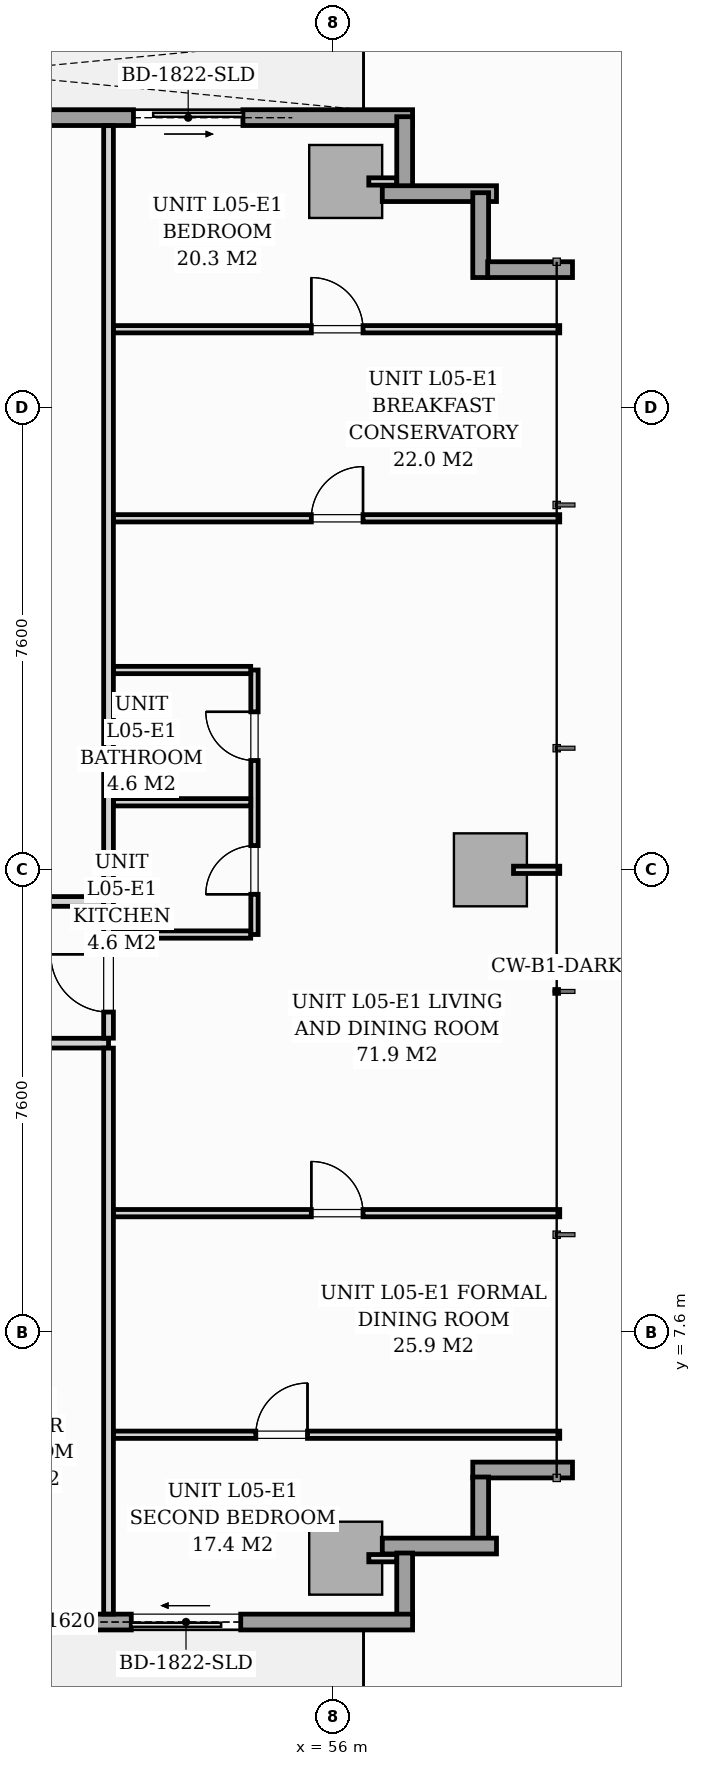
"""IFC4 building model, lengths in metres.
Left out: names, types, materials, properties, quantities, classifications, styles, units other than length and angle.
Written with IfcOpenShell. Run it as: python <this file> out.ifc"""

import sys

from ifc_helpers import new_model, si_unit, direction, frame, frame_2d, origin, origin_2d, place, context, subcontext, project, spatial, rectangle, extrude, source, transform, mapped, element, fill, save


model = new_model("IFC4")
c1 = context("Model", 3, precision=1e-05, world=origin(), true_north=direction((0.0, 1.0)))
c2 = subcontext(c1, "Body", "Model", "MODEL_VIEW")
j1 = project(units=[si_unit("LENGTHUNIT", "METRE"), si_unit("PLANEANGLEUNIT", "RADIAN")], contexts=[c1])
p1 = place(None, origin())
s1 = spatial("IfcSite", under=j1, at=p1, CompositionType="ELEMENT")
p2 = place(p1, origin())
s2 = spatial("IfcBuilding", under=s1, at=p2, CompositionType="ELEMENT")
p3 = place(p2, frame((0.0, 0.0, 23.0)))
s3 = spatial("IfcBuildingStorey", under=s2, at=p3, CompositionType="ELEMENT", Elevation=23.0)
m1 = source(origin(), c2, "Body", "SweptSolid", [
    extrude(rectangle(XDim=1.2, YDim=1.2, at=origin_2d()), origin(), (0.0, 0.0, 1.0), 3.194),
])
for number, where, z_axis, x_axis in (
    (1, (56.2, 3.88, 0.004), (0.0, 0.0, 1.0), (1.0, 0.0, 0.0)),
    (2, (56.2, 26.52, 0.004), (0.0, 0.0, 1.0), (1.0, 0.0, 0.0)),
    (3, (58.58, 15.2, 0.004), (0.0, 0.0, 1.0), (1.0, 0.0, 0.0)),
):
    element("IfcColumn", number, at=place(p3, frame(where, z_axis=z_axis, x_axis=x_axis)), inside=s3, PredefinedType="COLUMN", context=c2, shape_type="MappedRepresentation", body=[
        mapped(m1, transform((0.0, 0.0, 0.0), scale=1.0)),
    ])
p4 = place(p3, frame((40.15, 27.57, 0.0), z_axis=(0.0, 0.0, 1.0), x_axis=(1.0, 0.0, 0.0)))
e4 = element("IfcWall", 4, at=p4, inside=s3, PredefinedType="STANDARD", context=c2, shape_type="SweptSolid", body=[
    extrude(rectangle(XDim=17.15, YDim=0.26, at=frame_2d((8.575, 0.0))), origin(), (0.0, 0.0, 1.0), 2.94),
])
p5 = place(p4, frame((12.56, 0.0, 0.0)))
e5 = element("IfcOpeningElement", 5, at=p5, cuts=e4, PredefinedType="OPENING", context=c2, shape_type="SweptSolid", body=[
    extrude(rectangle(XDim=1.8, YDim=2.06, at=frame_2d((0.9, 1.03))), frame((0.0, 0.14, 0.0), z_axis=(0.0, -1.0, 0.0), x_axis=(1.0, 0.0, 0.0)), (0.0, 0.0, 1.0), 0.28),
])
p6 = place(p4, frame((0.7, 0.0, 0.65)))
e6 = element("IfcOpeningElement", 6, at=p6, cuts=e4, PredefinedType="OPENING", context=c2, shape_type="SweptSolid", body=[
    extrude(rectangle(XDim=1.6, YDim=1.5, at=frame_2d((0.8, 0.75))), frame((0.0, 0.14, 0.0), z_axis=(0.0, -1.0, 0.0), x_axis=(1.0, 0.0, 0.0)), (0.0, 0.0, 1.0), 0.28),
])
p7 = place(p3, frame((57.17, 27.585, 0.0), z_axis=(0.0, 0.0, 1.0), x_axis=(0.0, -1.0, 0.0)))
e7 = element("IfcWall", 7, at=p7, inside=s3, PredefinedType="STANDARD", context=c2, shape_type="SweptSolid", body=[
    extrude(rectangle(XDim=1.15, YDim=0.26, at=frame_2d((0.575, 0.0))), origin(), (0.0, 0.0, 1.0), 2.94),
])
p8 = place(p3, frame((56.802, 26.32, 0.0), z_axis=(0.0, 0.0, 1.0), x_axis=(1.0, 0.0, 0.0)))
e8 = element("IfcWall", 8, at=p8, inside=s3, PredefinedType="STANDARD", context=c2, shape_type="SweptSolid", body=[
    extrude(rectangle(XDim=1.878, YDim=0.26, at=frame_2d((0.939, 0.0))), origin(), (0.0, 0.0, 1.0), 2.94),
])
for number, where, z_axis, x_axis in (
    (9, (58.42, 26.335, 0.0), (0.0, 0.0, 1.0), (0.0, -1.0, 0.0)),
    (10, (58.535, 25.07, 0.0), (0.0, 0.0, 1.0), (1.0, 0.0, 0.0)),
):
    element("IfcWall", number, at=place(p3, frame(where, z_axis=z_axis, x_axis=x_axis)), inside=s3, PredefinedType="STANDARD", context=c2, shape_type="SweptSolid", body=[
        extrude(rectangle(XDim=1.395, YDim=0.26, at=frame_2d((0.698, 0.0))), origin(), (0.0, 0.0, 1.0), 2.94),
    ])
p9 = place(p3, frame((59.93, 5.33, 0.0), z_axis=(0.0, 0.0, 1.0), x_axis=(-1.0, 0.0, 0.0)))
e11 = element("IfcWall", 11, at=p9, inside=s3, PredefinedType="STANDARD", context=c2, shape_type="SweptSolid", body=[
    extrude(rectangle(XDim=1.64, YDim=0.26, at=frame_2d((0.82, 0.0))), origin(), (0.0, 0.0, 1.0), 2.94),
])
p10 = place(p3, frame((58.42, 5.215, 0.0), z_axis=(0.0, 0.0, 1.0), x_axis=(0.0, -1.0, 0.0)))
e12 = element("IfcWall", 12, at=p10, inside=s3, PredefinedType="STANDARD", context=c2, shape_type="SweptSolid", body=[
    extrude(rectangle(XDim=1.15, YDim=0.26, at=frame_2d((0.575, 0.0))), origin(), (0.0, 0.0, 1.0), 2.94),
])
p11 = place(p3, frame((58.68, 4.08, 0.0), z_axis=(0.0, 0.0, 1.0), x_axis=(-1.0, 0.0, 0.0)))
e13 = element("IfcWall", 13, at=p11, inside=s3, PredefinedType="STANDARD", context=c2, shape_type="SweptSolid", body=[
    extrude(rectangle(XDim=1.878, YDim=0.26, at=frame_2d((0.939, 0.0))), origin(), (0.0, 0.0, 1.0), 2.94),
])
p12 = place(p3, frame((57.17, 3.965, 0.0), z_axis=(0.0, 0.0, 1.0), x_axis=(0.0, -1.0, 0.0)))
e14 = element("IfcWall", 14, at=p12, inside=s3, PredefinedType="STANDARD", context=c2, shape_type="SweptSolid", body=[
    extrude(rectangle(XDim=1.15, YDim=0.26, at=frame_2d((0.575, 0.0))), origin(), (0.0, 0.0, 1.0), 2.94),
])
p13 = place(p3, frame((57.3, 2.83, 0.0), z_axis=(0.0, 0.0, 1.0), x_axis=(-1.0, 0.0, 0.0)))
e15 = element("IfcWall", 15, at=p13, inside=s3, PredefinedType="STANDARD", context=c2, shape_type="SweptSolid", body=[
    extrude(rectangle(XDim=17.15, YDim=0.26, at=frame_2d((8.575, 0.0))), origin(), (0.0, 0.0, 1.0), 2.94),
])
p14 = place(p13, frame((2.826, 0.0, 0.0)))
e16 = element("IfcOpeningElement", 16, at=p14, cuts=e15, PredefinedType="OPENING", context=c2, shape_type="SweptSolid", body=[
    extrude(rectangle(XDim=1.8, YDim=2.06, at=frame_2d((0.9, 1.03))), frame((0.0, 0.14, 0.0), z_axis=(0.0, -1.0, 0.0), x_axis=(1.0, 0.0, 0.0)), (0.0, 0.0, 1.0), 0.28),
])
p15 = place(p13, frame((5.675, 0.0, 0.75)))
e17 = element("IfcOpeningElement", 17, at=p15, cuts=e15, PredefinedType="OPENING", context=c2, shape_type="SweptSolid", body=[
    extrude(rectangle(XDim=1.6, YDim=1.5, at=frame_2d((0.8, 0.75))), frame((0.0, 0.14, 0.0), z_axis=(0.0, -1.0, 0.0), x_axis=(1.0, 0.0, 0.0)), (0.0, 0.0, 1.0), 0.28),
])
p16 = place(p3, frame((15.2, 12.35, 0.0), z_axis=(0.0, 0.0, 1.0), x_axis=(1.0, 0.0, 0.0)))
e18 = element("IfcWall", 18, at=p16, inside=s3, PredefinedType="PARTITIONING", context=c2, shape_type="SweptSolid", body=[
    extrude(rectangle(XDim=37.1, YDim=0.16, at=frame_2d((18.55, 0.0))), origin(), (0.0, 0.0, 1.0), 2.94),
])
p17 = place(p16, frame((2.964, 0.0, 0.0)))
e19 = element("IfcOpeningElement", 19, at=p17, cuts=e18, PredefinedType="OPENING", context=c2, shape_type="SweptSolid", body=[
    extrude(rectangle(XDim=0.95, YDim=2.06, at=frame_2d((0.475, 1.03))), frame((0.0, 0.09, 0.0), z_axis=(0.0, -1.0, 0.0), x_axis=(1.0, 0.0, 0.0)), (0.0, 0.0, 1.0), 0.18),
])
p18 = place(p16, frame((28.202, 0.0, 0.0)))
e20 = element("IfcOpeningElement", 20, at=p18, cuts=e18, PredefinedType="OPENING", context=c2, shape_type="SweptSolid", body=[
    extrude(rectangle(XDim=0.95, YDim=2.06, at=frame_2d((0.475, 1.03))), frame((0.0, 0.09, 0.0), z_axis=(0.0, -1.0, 0.0), x_axis=(1.0, 0.0, 0.0)), (0.0, 0.0, 1.0), 0.18),
])
p19 = place(p3, frame((52.3, 2.962, 0.0), z_axis=(0.0, 0.0, 1.0), x_axis=(0.0, 1.0, 0.0)))
e21 = element("IfcWall", 21, at=p19, inside=s3, PredefinedType="PARTITIONING", context=c2, shape_type="SweptSolid", body=[
    extrude(rectangle(XDim=9.306, YDim=0.16, at=frame_2d((4.653, 0.0))), origin(), (0.0, 0.0, 1.0), 2.94),
])
p20 = place(p3, frame((52.3, 12.432, 0.0), z_axis=(0.0, 0.0, 1.0), x_axis=(0.0, 1.0, 0.0)))
e22 = element("IfcWall", 22, at=p20, inside=s3, PredefinedType="PARTITIONING", context=c2, shape_type="SweptSolid", body=[
    extrude(rectangle(XDim=15.006, YDim=0.16, at=frame_2d((7.503, 0.0))), origin(), (0.0, 0.0, 1.0), 2.94),
])
p21 = place(p20, frame((0.429, 0.0, 0.0)))
e23 = element("IfcOpeningElement", 23, at=p21, cuts=e22, PredefinedType="OPENING", context=c2, shape_type="SweptSolid", body=[
    extrude(rectangle(XDim=0.95, YDim=2.06, at=frame_2d((0.475, 1.03))), frame((0.0, 0.09, 0.0), z_axis=(0.0, -1.0, 0.0), x_axis=(1.0, 0.0, 0.0)), (0.0, 0.0, 1.0), 0.18),
])
p22 = place(p3, frame((54.7, 14.136, 0.0), z_axis=(0.0, 0.0, 1.0), x_axis=(0.0, 1.0, 0.0)))
e24 = element("IfcWall", 24, at=p22, inside=s3, PredefinedType="PARTITIONING", context=c2, shape_type="SweptSolid", body=[
    extrude(rectangle(XDim=4.35, YDim=0.12, at=frame_2d((2.175, 0.0))), origin(), (0.0, 0.0, 1.0), 2.94),
])
p23 = place(p22, frame((0.662, 0.0, 0.0)))
e25 = element("IfcOpeningElement", 25, at=p23, cuts=e24, PredefinedType="OPENING", context=c2, shape_type="SweptSolid", body=[
    extrude(rectangle(XDim=0.8, YDim=2.0, at=frame_2d((0.4, 1.0))), frame((0.0, 0.07, 0.0), z_axis=(0.0, -1.0, 0.0), x_axis=(1.0, 0.0, 0.0)), (0.0, 0.0, 1.0), 0.14),
])
p24 = place(p22, frame((2.862, 0.0, 0.0)))
e26 = element("IfcOpeningElement", 26, at=p24, cuts=e24, PredefinedType="OPENING", context=c2, shape_type="SweptSolid", body=[
    extrude(rectangle(XDim=0.8, YDim=2.02, at=frame_2d((0.4, 1.01))), frame((0.0, 0.07, 0.0), z_axis=(0.0, -1.0, 0.0), x_axis=(1.0, 0.0, 0.0)), (0.0, 0.0, 1.0), 0.14),
])
p25 = place(p3, frame((52.382, 16.311, 0.0), z_axis=(0.0, 0.0, 1.0), x_axis=(1.0, 0.0, 0.0)))
e27 = element("IfcWall", 27, at=p25, inside=s3, PredefinedType="PARTITIONING", context=c2, shape_type="SweptSolid", body=[
    extrude(rectangle(XDim=2.256, YDim=0.12, at=frame_2d((1.128, 0.0))), origin(), (0.0, 0.0, 1.0), 2.045),
])
for number, where, z_axis, x_axis in (
    (28, (52.382, 14.136, 0.0), (0.0, 0.0, 1.0), (1.0, 0.0, 0.0)),
    (29, (52.382, 18.486, 0.0), (0.0, 0.0, 1.0), (1.0, 0.0, 0.0)),
):
    element("IfcWall", number, at=place(p3, frame(where, z_axis=z_axis, x_axis=x_axis)), inside=s3, PredefinedType="PARTITIONING", context=c2, shape_type="SweptSolid", body=[
        extrude(rectangle(XDim=2.256, YDim=0.12, at=frame_2d((1.128, 0.0))), origin(), (0.0, 0.0, 1.0), 2.94),
    ])
p26 = place(p3, frame((52.382, 24.09, 0.0), z_axis=(0.0, 0.0, 1.0), x_axis=(1.0, 0.0, 0.0)))
e30 = element("IfcWall", 30, at=p26, inside=s3, PredefinedType="PARTITIONING", context=c2, shape_type="SweptSolid", body=[
    extrude(rectangle(XDim=7.338, YDim=0.12, at=frame_2d((3.669, 0.0))), origin(), (0.0, 0.0, 1.0), 2.94),
])
p27 = place(p26, frame((3.253, 0.0, 0.0)))
e31 = element("IfcOpeningElement", 31, at=p27, cuts=e30, PredefinedType="OPENING", context=c2, shape_type="SweptSolid", body=[
    extrude(rectangle(XDim=0.85, YDim=2.05, at=frame_2d((0.425, 1.025))), frame((0.0, 0.07, 0.0), z_axis=(0.0, -1.0, 0.0), x_axis=(1.0, 0.0, 0.0)), (0.0, 0.0, 1.0), 0.14),
])
p28 = place(p3, frame((52.382, 5.91, 0.0), z_axis=(0.0, 0.0, 1.0), x_axis=(1.0, 0.0, 0.0)))
e32 = element("IfcWall", 32, at=p28, inside=s3, PredefinedType="PARTITIONING", context=c2, shape_type="SweptSolid", body=[
    extrude(rectangle(XDim=7.338, YDim=0.12, at=frame_2d((3.669, 0.0))), origin(), (0.0, 0.0, 1.0), 2.94),
])
p29 = place(p28, frame((2.34, 0.0, 0.0)))
e33 = element("IfcOpeningElement", 33, at=p29, cuts=e32, PredefinedType="OPENING", context=c2, shape_type="SweptSolid", body=[
    extrude(rectangle(XDim=0.85, YDim=2.05, at=frame_2d((0.425, 1.025))), frame((0.0, 0.07, 0.0), z_axis=(0.0, -1.0, 0.0), x_axis=(1.0, 0.0, 0.0)), (0.0, 0.0, 1.0), 0.14),
])
p30 = place(p3, frame((52.382, 9.554, 0.0), z_axis=(0.0, 0.0, 1.0), x_axis=(1.0, 0.0, 0.0)))
e34 = element("IfcWall", 34, at=p30, inside=s3, PredefinedType="PARTITIONING", context=c2, shape_type="SweptSolid", body=[
    extrude(rectangle(XDim=7.338, YDim=0.12, at=frame_2d((3.669, 0.0))), origin(), (0.0, 0.0, 1.0), 2.94),
])
p31 = place(p30, frame((3.253, 0.0, 0.0)))
e35 = element("IfcOpeningElement", 35, at=p31, cuts=e34, PredefinedType="OPENING", context=c2, shape_type="SweptSolid", body=[
    extrude(rectangle(XDim=0.85, YDim=2.05, at=frame_2d((0.425, 1.025))), frame((0.0, 0.07, 0.0), z_axis=(0.0, -1.0, 0.0), x_axis=(1.0, 0.0, 0.0)), (0.0, 0.0, 1.0), 0.14),
])
p32 = place(p3, frame((52.382, 20.981, 0.0), z_axis=(0.0, 0.0, 1.0), x_axis=(1.0, 0.0, 0.0)))
e36 = element("IfcWall", 36, at=p32, inside=s3, PredefinedType="PARTITIONING", context=c2, shape_type="SweptSolid", body=[
    extrude(rectangle(XDim=7.338, YDim=0.12, at=frame_2d((3.669, 0.0))), origin(), (0.0, 0.0, 1.0), 2.94),
])
p33 = place(p32, frame((3.253, 0.0, 0.0)))
e37 = element("IfcOpeningElement", 37, at=p33, cuts=e36, PredefinedType="OPENING", context=c2, shape_type="SweptSolid", body=[
    extrude(rectangle(XDim=0.85, YDim=2.05, at=frame_2d((0.425, 1.025))), frame((0.0, 0.07, 0.0), z_axis=(0.0, -1.0, 0.0), x_axis=(1.0, 0.0, 0.0)), (0.0, 0.0, 1.0), 0.14),
])
p34 = place(p3, frame((45.84, 14.68, 0.0), z_axis=(0.0, 0.0, 1.0), x_axis=(1.0, 0.0, 0.0)))
e38 = element("IfcWall", 38, at=p34, inside=s3, PredefinedType="PARTITIONING", context=c2, shape_type="SweptSolid", body=[
    extrude(rectangle(XDim=6.378, YDim=0.16, at=frame_2d((3.189, 0.0))), origin(), (0.0, 0.0, 1.0), 2.94),
])
p35 = place(p34, frame((2.815, 0.0, 0.0)))
e39 = element("IfcOpeningElement", 39, at=p35, cuts=e38, PredefinedType="OPENING", context=c2, shape_type="SweptSolid", body=[
    extrude(rectangle(XDim=0.95, YDim=2.06, at=frame_2d((0.475, 1.03))), frame((0.0, 0.09, 0.0), z_axis=(0.0, -1.0, 0.0), x_axis=(1.0, 0.0, 0.0)), (0.0, 0.0, 1.0), 0.18),
])
for number, where, z_axis, x_axis in (
    (40, (56.58, 3.88, 0.0), (0.0, 0.0, 1.0), (1.0, 0.0, 0.0)),
    (41, (56.58, 26.52, 0.0), (0.0, 0.0, 1.0), (1.0, 0.0, 0.0)),
):
    element("IfcWall", number, at=place(p3, frame(where, z_axis=z_axis, x_axis=x_axis)), inside=s3, PredefinedType="PARTITIONING", context=c2, shape_type="SweptSolid", body=[
        extrude(rectangle(XDim=0.458, YDim=0.12, at=frame_2d((0.229, 0.0))), origin(), (0.0, 0.0, 1.0), 2.94),
    ])
p36 = place(p3, frame((58.96, 15.2, 0.0), z_axis=(0.0, 0.0, 1.0), x_axis=(1.0, 0.0, 0.0)))
e42 = element("IfcWall", 42, at=p36, inside=s3, PredefinedType="PARTITIONING", context=c2, shape_type="SweptSolid", body=[
    extrude(rectangle(XDim=0.76, YDim=0.12, at=frame_2d((0.38, 0.0))), origin(), (0.0, 0.0, 1.0), 2.94),
])
m2 = source(origin(), c2, "Body", "SweptSolid", [
    extrude(rectangle(XDim=1.8, YDim=2.06, at=frame_2d((0.9, 1.03))), frame((0.0, 0.025, 0.0), z_axis=(0.0, -1.0, 0.0), x_axis=(1.0, 0.0, 0.0)), (0.0, 0.0, 1.0), 0.05),
])
p37 = place(p5, origin())
e43 = element("IfcDoor", 43, at=p37, inside=s3, OperationType="SLIDING_TO_RIGHT", PredefinedType="DOOR", context=c2, shape_type="MappedRepresentation", body=[
    mapped(m2, transform((0.0, 0.0, 0.0), scale=1.0)),
])
fill(e5, e43)
p38 = place(p14, origin())
e44 = element("IfcDoor", 44, at=p38, inside=s3, OperationType="SLIDING_TO_RIGHT", PredefinedType="DOOR", context=c2, shape_type="MappedRepresentation", body=[
    mapped(m2, transform((0.0, 0.0, 0.0), scale=1.0)),
])
fill(e16, e44)
m3 = source(origin(), c2, "Body", "SweptSolid", [
    extrude(rectangle(XDim=1.6, YDim=1.5, at=frame_2d((0.8, 0.75))), frame((0.0, 0.03, 0.0), z_axis=(0.0, -1.0, 0.0), x_axis=(1.0, 0.0, 0.0)), (0.0, 0.0, 1.0), 0.06),
])
p39 = place(p15, origin())
e45 = element("IfcWindow", 45, at=p39, inside=s3, PartitioningType="SINGLE_PANEL", PredefinedType="WINDOW", context=c2, shape_type="MappedRepresentation", body=[
    mapped(m3, transform((0.0, 0.0, 0.0), scale=1.0)),
])
fill(e17, e45)
m4 = source(origin(), c2, "Body", "SweptSolid", [
    extrude(rectangle(XDim=0.95, YDim=2.06, at=frame_2d((0.475, 1.03))), frame((0.0, 0.025, 0.0), z_axis=(0.0, -1.0, 0.0), x_axis=(1.0, 0.0, 0.0)), (0.0, 0.0, 1.0), 0.05),
])
p40 = place(p21, origin())
e46 = element("IfcDoor", 46, at=p40, inside=s3, OperationType="SINGLE_SWING_RIGHT", PredefinedType="DOOR", context=c2, shape_type="MappedRepresentation", body=[
    mapped(m4, transform((0.0, 0.0, 0.0), scale=1.0)),
])
fill(e23, e46)
m5 = source(origin(), c2, "Body", "SweptSolid", [
    extrude(rectangle(XDim=0.8, YDim=2.0, at=frame_2d((0.4, 1.0))), frame((0.0, 0.025, 0.0), z_axis=(0.0, -1.0, 0.0), x_axis=(1.0, 0.0, 0.0)), (0.0, 0.0, 1.0), 0.05),
])
p41 = place(p23, origin())
e47 = element("IfcDoor", 47, at=p41, inside=s3, OperationType="SINGLE_SWING_LEFT", PredefinedType="DOOR", context=c2, shape_type="MappedRepresentation", body=[
    mapped(m5, transform((0.0, 0.0, 0.0), scale=1.0)),
])
fill(e25, e47)
m6 = source(origin(), c2, "Body", "SweptSolid", [
    extrude(rectangle(XDim=0.8, YDim=2.02, at=frame_2d((0.4, 1.01))), frame((0.0, 0.025, 0.0), z_axis=(0.0, -1.0, 0.0), x_axis=(1.0, 0.0, 0.0)), (0.0, 0.0, 1.0), 0.05),
])
p42 = place(p24, origin())
e48 = element("IfcDoor", 48, at=p42, inside=s3, OperationType="SINGLE_SWING_RIGHT", PredefinedType="DOOR", context=c2, shape_type="MappedRepresentation", body=[
    mapped(m6, transform((0.0, 0.0, 0.0), scale=1.0)),
])
fill(e26, e48)
m7 = source(origin(), c2, "Body", "SweptSolid", [
    extrude(rectangle(XDim=0.85, YDim=2.05, at=frame_2d((0.425, 1.025))), frame((0.0, 0.025, 0.0), z_axis=(0.0, -1.0, 0.0), x_axis=(1.0, 0.0, 0.0)), (0.0, 0.0, 1.0), 0.05),
])
p43 = place(p27, origin())
e49 = element("IfcDoor", 49, at=p43, inside=s3, OperationType="SINGLE_SWING_LEFT", PredefinedType="DOOR", context=c2, shape_type="MappedRepresentation", body=[
    mapped(m7, transform((0.0, 0.0, 0.0), scale=1.0)),
])
fill(e31, e49)
p44 = place(p29, origin())
e50 = element("IfcDoor", 50, at=p44, inside=s3, OperationType="SINGLE_SWING_RIGHT", PredefinedType="DOOR", context=c2, shape_type="MappedRepresentation", body=[
    mapped(m7, transform((0.0, 0.0, 0.0), scale=1.0)),
])
fill(e33, e50)
p45 = place(p31, origin())
e51 = element("IfcDoor", 51, at=p45, inside=s3, OperationType="SINGLE_SWING_LEFT", PredefinedType="DOOR", context=c2, shape_type="MappedRepresentation", body=[
    mapped(m7, transform((0.0, 0.0, 0.0), scale=1.0)),
])
fill(e35, e51)
p46 = place(p33, origin())
e52 = element("IfcDoor", 52, at=p46, inside=s3, OperationType="SINGLE_SWING_RIGHT", PredefinedType="DOOR", context=c2, shape_type="MappedRepresentation", body=[
    mapped(m7, transform((0.0, 0.0, 0.0), scale=1.0)),
])
fill(e37, e52)
save(model, sys.argv[1])
